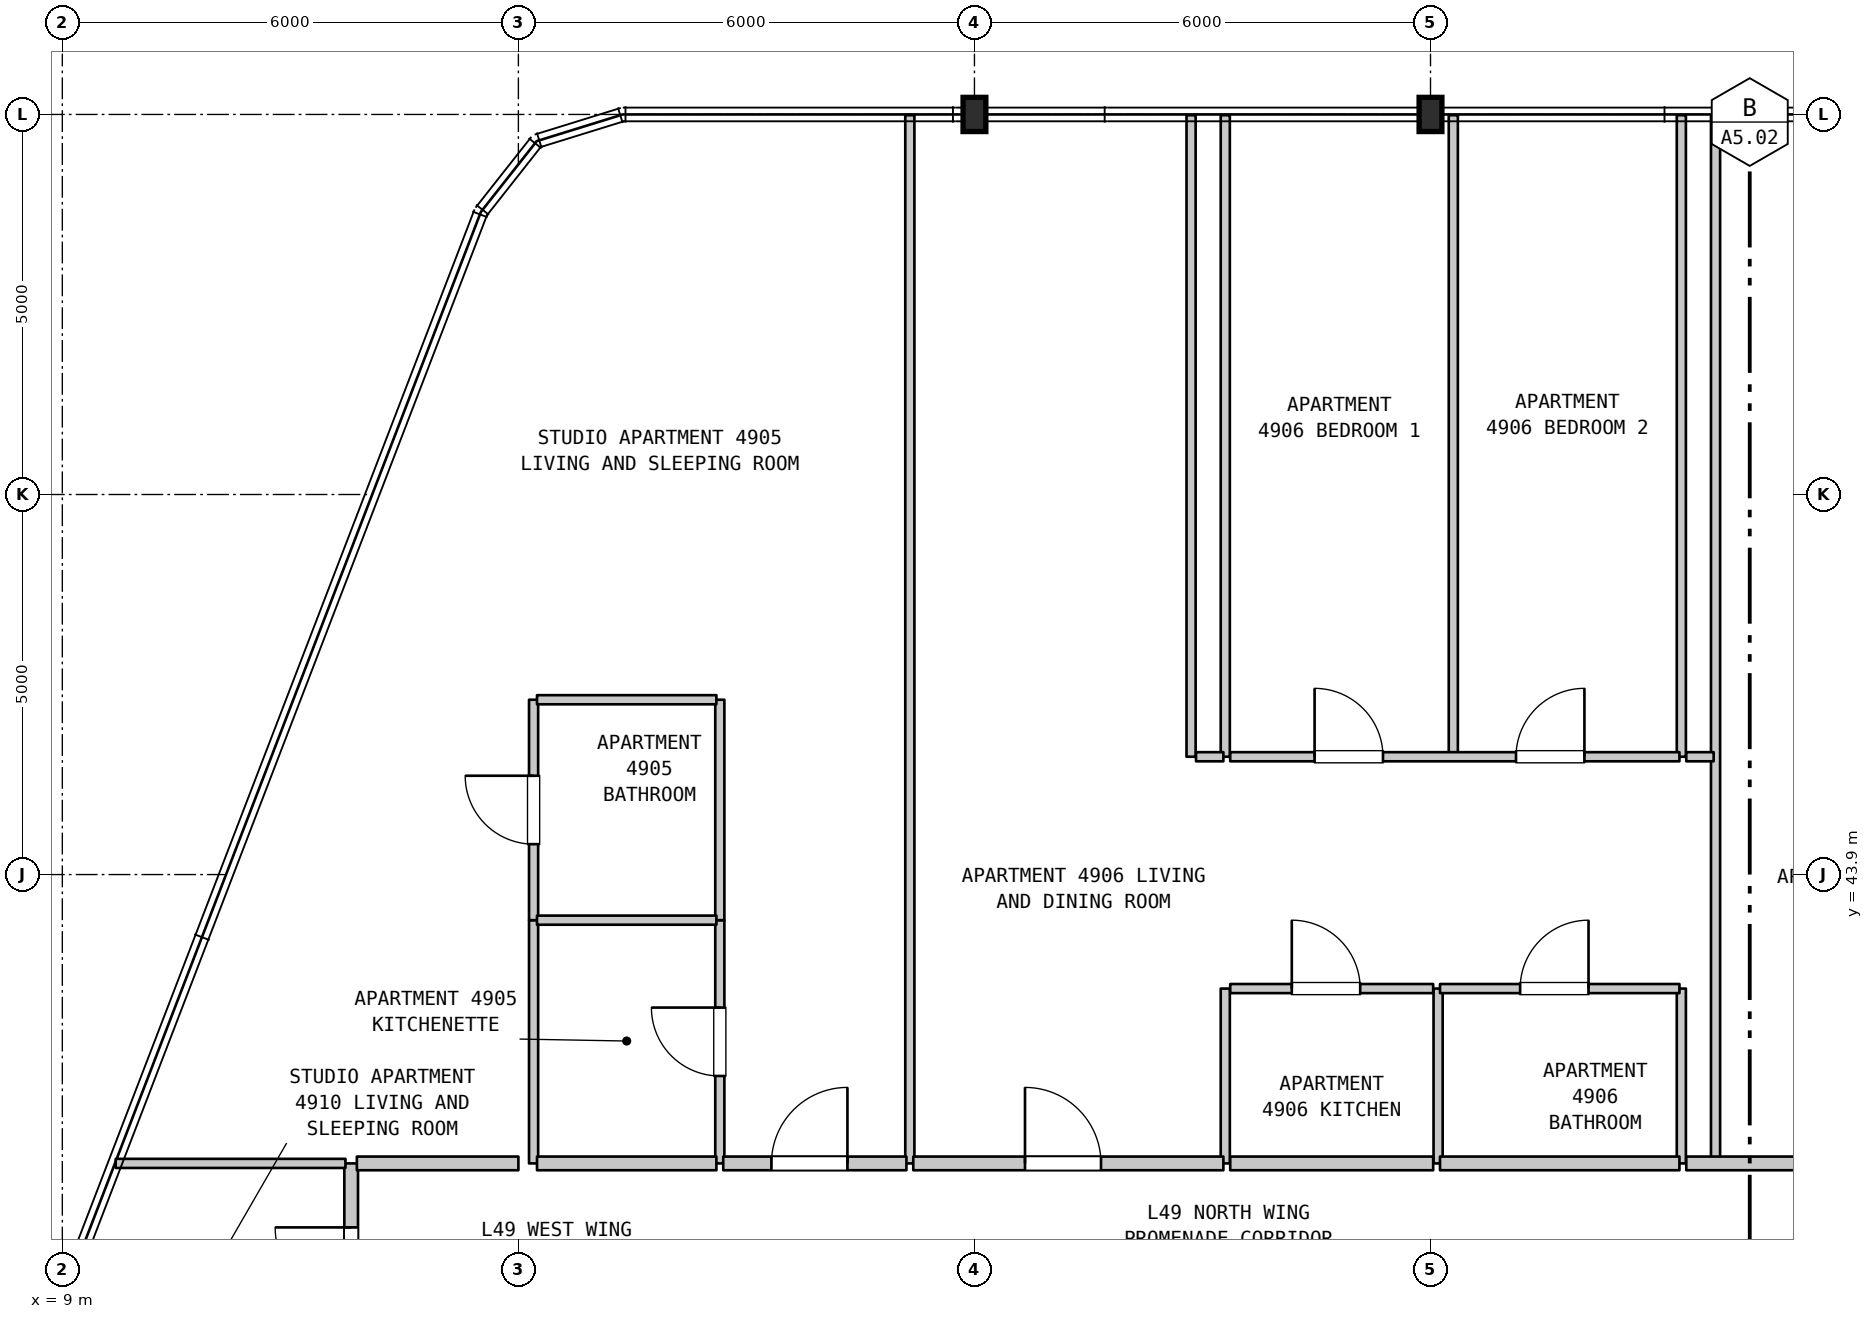
"""IFC4 building model, lengths in metres.
Left out: names, types, materials, properties, quantities, classifications, styles, units other than length and angle.
Written with IfcOpenShell. Run it as: python <this file> out.ifc"""

import sys

from ifc_helpers import new_model, si_unit, direction, frame, frame_2d, origin, origin_2d, place, context, subcontext, project, spatial, rectangle, i_section, extrude, element, fill, save


model = new_model("IFC4")
c1 = context("Model", 3, precision=1e-05, world=origin(), true_north=direction((0.0, 1.0)))
c2 = subcontext(c1, "Body", "Model", "MODEL_VIEW")
j1 = project(units=[si_unit("LENGTHUNIT", "METRE"), si_unit("PLANEANGLEUNIT", "RADIAN")], contexts=[c1])
p1 = place(None, origin())
s1 = spatial("IfcSite", under=j1, at=p1, CompositionType="ELEMENT")
p2 = place(p1, origin())
s2 = spatial("IfcBuilding", under=s1, at=p2, CompositionType="ELEMENT")
p3 = place(p2, frame((0.0, 0.0, 199.5)))
s3 = spatial("IfcBuildingStorey", under=s2, at=p3, CompositionType="ELEMENT", Elevation=199.5)
for number, where, z_axis, x_axis in (
    (1, (21.0, 53.9, 0.0), (0.0, 0.0, 1.0), (1.0, 0.0, 0.0)),
    (2, (27.0, 53.9, 0.0), (0.0, 0.0, 1.0), (1.0, 0.0, 0.0)),
):
    element("IfcColumn", number, at=place(p3, frame(where, z_axis=z_axis, x_axis=x_axis)), inside=s3, PredefinedType="COLUMN", context=c2, shape_type="SweptSolid", body=[
        extrude(i_section(OverallWidth=0.3, OverallDepth=0.45, WebThickness=0.014, FlangeThickness=0.026, FilletRadius=0.027, at=origin_2d()), origin(), (0.0, 0.0, 1.0), 3.7),
    ])
p4 = place(p3, frame((12.8, 37.416, 0.0), z_axis=(0.0, 0.0, 1.0), x_axis=(0.0, 1.0, 0.0)))
e3 = element("IfcWall", 3, at=p4, inside=s3, PredefinedType="STANDARD", context=c2, shape_type="SweptSolid", body=[
    extrude(rectangle(XDim=2.684, YDim=0.18, at=frame_2d((1.342, 0.0))), origin(), (0.0, 0.0, 1.0), 3.39),
])
p5 = place(p4, frame((0.842, 0.0, 0.0)))
e4 = element("IfcOpeningElement", 4, at=p5, cuts=e3, PredefinedType="OPENING", context=c2, shape_type="SweptSolid", body=[
    extrude(rectangle(XDim=1.0, YDim=2.15, at=frame_2d((0.5, 1.075))), frame((0.0, 0.1, 0.0), z_axis=(0.0, -1.0, 0.0), x_axis=(1.0, 0.0, 0.0)), (0.0, 0.0, 1.0), 0.2),
])
p6 = place(p3, frame((15.2, 40.1, 0.0), z_axis=(0.0, 0.0, 1.0), x_axis=(0.0, 1.0, 0.0)))
e5 = element("IfcWall", 5, at=p6, inside=s3, PredefinedType="PARTITIONING", context=c2, shape_type="SweptSolid", body=[
    extrude(rectangle(XDim=3.2, YDim=0.12, at=frame_2d((1.6, 0.0))), origin(), (0.0, 0.0, 1.0), 3.39),
])
p7 = place(p3, frame((15.2, 43.3, 0.0), z_axis=(0.0, 0.0, 1.0), x_axis=(0.0, 1.0, 0.0)))
e6 = element("IfcWall", 6, at=p7, inside=s3, PredefinedType="PARTITIONING", context=c2, shape_type="SweptSolid", body=[
    extrude(rectangle(XDim=2.9, YDim=0.12, at=frame_2d((1.45, 0.0))), origin(), (0.0, 0.0, 1.0), 3.39),
])
p8 = place(p7, frame((1.0, 0.0, 0.0)))
e7 = element("IfcOpeningElement", 7, at=p8, cuts=e6, PredefinedType="OPENING", context=c2, shape_type="SweptSolid", body=[
    extrude(rectangle(XDim=0.9, YDim=2.1, at=frame_2d((0.45, 1.05))), frame((0.0, 0.07, 0.0), z_axis=(0.0, -1.0, 0.0), x_axis=(1.0, 0.0, 0.0)), (0.0, 0.0, 1.0), 0.14),
])
p9 = place(p3, frame((17.65, 40.1, 0.0), z_axis=(0.0, 0.0, 1.0), x_axis=(0.0, 1.0, 0.0)))
e8 = element("IfcWall", 8, at=p9, inside=s3, PredefinedType="PARTITIONING", context=c2, shape_type="SweptSolid", body=[
    extrude(rectangle(XDim=3.2, YDim=0.12, at=frame_2d((1.6, 0.0))), origin(), (0.0, 0.0, 1.0), 3.39),
])
p10 = place(p9, frame((1.15, 0.0, 0.0)))
e9 = element("IfcOpeningElement", 9, at=p10, cuts=e8, PredefinedType="OPENING", context=c2, shape_type="SweptSolid", body=[
    extrude(rectangle(XDim=0.9, YDim=2.15, at=frame_2d((0.45, 1.075))), frame((0.0, 0.07, 0.0), z_axis=(0.0, -1.0, 0.0), x_axis=(1.0, 0.0, 0.0)), (0.0, 0.0, 1.0), 0.14),
])
p11 = place(p3, frame((17.65, 43.3, 0.0), z_axis=(0.0, 0.0, 1.0), x_axis=(0.0, 1.0, 0.0)))
e10 = element("IfcWall", 10, at=p11, inside=s3, PredefinedType="PARTITIONING", context=c2, shape_type="SweptSolid", body=[
    extrude(rectangle(XDim=2.9, YDim=0.12, at=frame_2d((1.45, 0.0))), origin(), (0.0, 0.0, 1.0), 3.39),
])
p12 = place(p3, frame((20.15, 40.1, 0.0), z_axis=(0.0, 0.0, 1.0), x_axis=(0.0, 1.0, 0.0)))
e11 = element("IfcWall", 11, at=p12, inside=s3, PredefinedType="PARTITIONING", context=c2, shape_type="SweptSolid", body=[
    extrude(rectangle(XDim=13.79, YDim=0.12, at=frame_2d((6.895, 0.0))), origin(), (0.0, 0.0, 1.0), 3.39),
])
p13 = place(p3, frame((23.85, 45.45, 0.0), z_axis=(0.0, 0.0, 1.0), x_axis=(0.0, 1.0, 0.0)))
e12 = element("IfcWall", 12, at=p13, inside=s3, PredefinedType="PARTITIONING", context=c2, shape_type="SweptSolid", body=[
    extrude(rectangle(XDim=8.44, YDim=0.12, at=frame_2d((4.22, 0.0))), origin(), (0.0, 0.0, 1.0), 3.39),
])
p14 = place(p3, frame((24.3, 40.1, 0.0), z_axis=(0.0, 0.0, 1.0), x_axis=(0.0, 1.0, 0.0)))
e13 = element("IfcWall", 13, at=p14, inside=s3, PredefinedType="PARTITIONING", context=c2, shape_type="SweptSolid", body=[
    extrude(rectangle(XDim=2.3, YDim=0.12, at=frame_2d((1.15, 0.0))), origin(), (0.0, 0.0, 1.0), 3.39),
])
p15 = place(p3, frame((24.3, 45.45, 0.0), z_axis=(0.0, 0.0, 1.0), x_axis=(0.0, 1.0, 0.0)))
e14 = element("IfcWall", 14, at=p15, inside=s3, PredefinedType="PARTITIONING", context=c2, shape_type="SweptSolid", body=[
    extrude(rectangle(XDim=8.44, YDim=0.12, at=frame_2d((4.22, 0.0))), origin(), (0.0, 0.0, 1.0), 3.39),
])
p16 = place(p3, frame((27.1, 40.1, 0.0), z_axis=(0.0, 0.0, 1.0), x_axis=(0.0, 1.0, 0.0)))
e15 = element("IfcWall", 15, at=p16, inside=s3, PredefinedType="PARTITIONING", context=c2, shape_type="SweptSolid", body=[
    extrude(rectangle(XDim=2.3, YDim=0.12, at=frame_2d((1.15, 0.0))), origin(), (0.0, 0.0, 1.0), 3.39),
])
p17 = place(p3, frame((27.3, 45.45, 0.0), z_axis=(0.0, 0.0, 1.0), x_axis=(0.0, 1.0, 0.0)))
e16 = element("IfcWall", 16, at=p17, inside=s3, PredefinedType="PARTITIONING", context=c2, shape_type="SweptSolid", body=[
    extrude(rectangle(XDim=8.44, YDim=0.12, at=frame_2d((4.22, 0.0))), origin(), (0.0, 0.0, 1.0), 3.39),
])
p18 = place(p3, frame((30.3, 40.1, 0.0), z_axis=(0.0, 0.0, 1.0), x_axis=(0.0, 1.0, 0.0)))
e17 = element("IfcWall", 17, at=p18, inside=s3, PredefinedType="PARTITIONING", context=c2, shape_type="SweptSolid", body=[
    extrude(rectangle(XDim=2.3, YDim=0.12, at=frame_2d((1.15, 0.0))), origin(), (0.0, 0.0, 1.0), 3.39),
])
p19 = place(p3, frame((30.3, 45.45, 0.0), z_axis=(0.0, 0.0, 1.0), x_axis=(0.0, 1.0, 0.0)))
e18 = element("IfcWall", 18, at=p19, inside=s3, PredefinedType="PARTITIONING", context=c2, shape_type="SweptSolid", body=[
    extrude(rectangle(XDim=8.44, YDim=0.12, at=frame_2d((4.22, 0.0))), origin(), (0.0, 0.0, 1.0), 3.39),
])
p20 = place(p3, frame((30.75, 40.1, 0.0), z_axis=(0.0, 0.0, 1.0), x_axis=(0.0, 1.0, 0.0)))
e19 = element("IfcWall", 19, at=p20, inside=s3, PredefinedType="PARTITIONING", context=c2, shape_type="SweptSolid", body=[
    extrude(rectangle(XDim=13.79, YDim=0.12, at=frame_2d((6.895, 0.0))), origin(), (0.0, 0.0, 1.0), 3.39),
])
p21 = place(p3, frame((9.702, 40.1, 0.0), z_axis=(0.0, 0.0, 1.0), x_axis=(1.0, 0.0, 0.0)))
e20 = element("IfcWall", 20, at=p21, inside=s3, PredefinedType="PARTITIONING", context=c2, shape_type="SweptSolid", body=[
    extrude(rectangle(XDim=3.023, YDim=0.12, at=frame_2d((1.512, 0.0))), origin(), (0.0, 0.0, 1.0), 3.39),
])
p22 = place(p3, frame((12.875, 40.1, 0.0), z_axis=(0.0, 0.0, 1.0), x_axis=(1.0, 0.0, 0.0)))
e21 = element("IfcWall", 21, at=p22, inside=s3, PredefinedType="STANDARD", context=c2, shape_type="SweptSolid", body=[
    extrude(rectangle(XDim=2.125, YDim=0.18, at=frame_2d((1.062, 0.0))), origin(), (0.0, 0.0, 1.0), 3.39),
])
p23 = place(p3, frame((15.245, 40.1, 0.0), z_axis=(0.0, 0.0, 1.0), x_axis=(1.0, 0.0, 0.0)))
e22 = element("IfcWall", 22, at=p23, inside=s3, PredefinedType="STANDARD", context=c2, shape_type="SweptSolid", body=[
    extrude(rectangle(XDim=2.36, YDim=0.18, at=frame_2d((1.18, 0.0))), origin(), (0.0, 0.0, 1.0), 3.39),
])
p24 = place(p3, frame((17.695, 40.1, 0.0), z_axis=(0.0, 0.0, 1.0), x_axis=(1.0, 0.0, 0.0)))
e23 = element("IfcWall", 23, at=p24, inside=s3, PredefinedType="STANDARD", context=c2, shape_type="SweptSolid", body=[
    extrude(rectangle(XDim=2.41, YDim=0.18, at=frame_2d((1.205, 0.0))), origin(), (0.0, 0.0, 1.0), 3.39),
])
p25 = place(p24, frame((0.634, 0.0, 0.0)))
e24 = element("IfcOpeningElement", 24, at=p25, cuts=e23, PredefinedType="OPENING", context=c2, shape_type="SweptSolid", body=[
    extrude(rectangle(XDim=1.0, YDim=2.15, at=frame_2d((0.5, 1.075))), frame((0.0, 0.1, 0.0), z_axis=(0.0, -1.0, 0.0), x_axis=(1.0, 0.0, 0.0)), (0.0, 0.0, 1.0), 0.2),
])
p26 = place(p3, frame((20.195, 40.1, 0.0), z_axis=(0.0, 0.0, 1.0), x_axis=(1.0, 0.0, 0.0)))
e25 = element("IfcWall", 25, at=p26, inside=s3, PredefinedType="STANDARD", context=c2, shape_type="SweptSolid", body=[
    extrude(rectangle(XDim=4.08, YDim=0.18, at=frame_2d((2.04, 0.0))), origin(), (0.0, 0.0, 1.0), 3.39),
])
p27 = place(p26, frame((1.47, 0.0, 0.0)))
e26 = element("IfcOpeningElement", 26, at=p27, cuts=e25, PredefinedType="OPENING", context=c2, shape_type="SweptSolid", body=[
    extrude(rectangle(XDim=1.0, YDim=2.15, at=frame_2d((0.5, 1.075))), frame((0.0, 0.1, 0.0), z_axis=(0.0, -1.0, 0.0), x_axis=(1.0, 0.0, 0.0)), (0.0, 0.0, 1.0), 0.2),
])
p28 = place(p3, frame((24.365, 40.1, 0.0), z_axis=(0.0, 0.0, 1.0), x_axis=(1.0, 0.0, 0.0)))
e27 = element("IfcWall", 27, at=p28, inside=s3, PredefinedType="STANDARD", context=c2, shape_type="SweptSolid", body=[
    extrude(rectangle(XDim=2.67, YDim=0.18, at=frame_2d((1.335, 0.0))), origin(), (0.0, 0.0, 1.0), 3.39),
])
p29 = place(p3, frame((27.125, 40.1, 0.0), z_axis=(0.0, 0.0, 1.0), x_axis=(1.0, 0.0, 0.0)))
e28 = element("IfcWall", 28, at=p29, inside=s3, PredefinedType="STANDARD", context=c2, shape_type="SweptSolid", body=[
    extrude(rectangle(XDim=3.15, YDim=0.18, at=frame_2d((1.575, 0.0))), origin(), (0.0, 0.0, 1.0), 3.39),
])
p30 = place(p3, frame((30.365, 40.1, 0.0), z_axis=(0.0, 0.0, 1.0), x_axis=(1.0, 0.0, 0.0)))
e29 = element("IfcWall", 29, at=p30, inside=s3, PredefinedType="STANDARD", context=c2, shape_type="SweptSolid", body=[
    extrude(rectangle(XDim=4.75, YDim=0.18, at=frame_2d((2.375, 0.0))), origin(), (0.0, 0.0, 1.0), 3.39),
])
p31 = place(p30, frame((2.075, 0.0, 0.0)))
e30 = element("IfcOpeningElement", 30, at=p31, cuts=e29, PredefinedType="OPENING", context=c2, shape_type="SweptSolid", body=[
    extrude(rectangle(XDim=1.0, YDim=2.15, at=frame_2d((0.5, 1.075))), frame((0.0, 0.1, 0.0), z_axis=(0.0, -1.0, 0.0), x_axis=(1.0, 0.0, 0.0)), (0.0, 0.0, 1.0), 0.2),
])
p32 = place(p3, frame((24.365, 42.4, 0.0), z_axis=(0.0, 0.0, 1.0), x_axis=(1.0, 0.0, 0.0)))
e31 = element("IfcWall", 31, at=p32, inside=s3, PredefinedType="PARTITIONING", context=c2, shape_type="SweptSolid", body=[
    extrude(rectangle(XDim=2.67, YDim=0.12, at=frame_2d((1.335, 0.0))), origin(), (0.0, 0.0, 1.0), 3.39),
])
p33 = place(p32, frame((0.81, 0.0, 0.0)))
e32 = element("IfcOpeningElement", 32, at=p33, cuts=e31, PredefinedType="OPENING", context=c2, shape_type="SweptSolid", body=[
    extrude(rectangle(XDim=0.9, YDim=2.15, at=frame_2d((0.45, 1.075))), frame((0.0, 0.07, 0.0), z_axis=(0.0, -1.0, 0.0), x_axis=(1.0, 0.0, 0.0)), (0.0, 0.0, 1.0), 0.14),
])
p34 = place(p3, frame((27.125, 42.4, 0.0), z_axis=(0.0, 0.0, 1.0), x_axis=(1.0, 0.0, 0.0)))
e33 = element("IfcWall", 33, at=p34, inside=s3, PredefinedType="PARTITIONING", context=c2, shape_type="SweptSolid", body=[
    extrude(rectangle(XDim=3.15, YDim=0.12, at=frame_2d((1.575, 0.0))), origin(), (0.0, 0.0, 1.0), 3.39),
])
p35 = place(p34, frame((1.054, 0.0, 0.0)))
e34 = element("IfcOpeningElement", 34, at=p35, cuts=e33, PredefinedType="OPENING", context=c2, shape_type="SweptSolid", body=[
    extrude(rectangle(XDim=0.9, YDim=2.1, at=frame_2d((0.45, 1.05))), frame((0.0, 0.07, 0.0), z_axis=(0.0, -1.0, 0.0), x_axis=(1.0, 0.0, 0.0)), (0.0, 0.0, 1.0), 0.14),
])
p36 = place(p3, frame((15.245, 43.3, 0.0), z_axis=(0.0, 0.0, 1.0), x_axis=(1.0, 0.0, 0.0)))
e35 = element("IfcWall", 35, at=p36, inside=s3, PredefinedType="PARTITIONING", context=c2, shape_type="SweptSolid", body=[
    extrude(rectangle(XDim=2.36, YDim=0.12, at=frame_2d((1.18, 0.0))), origin(), (0.0, 0.0, 1.0), 3.39),
])
p37 = place(p3, frame((23.915, 45.45, 0.0), z_axis=(0.0, 0.0, 1.0), x_axis=(1.0, 0.0, 0.0)))
e36 = element("IfcWall", 36, at=p37, inside=s3, PredefinedType="PARTITIONING", context=c2, shape_type="SweptSolid", body=[
    extrude(rectangle(XDim=0.36, YDim=0.12, at=frame_2d((0.18, 0.0))), origin(), (0.0, 0.0, 1.0), 3.39),
])
p38 = place(p3, frame((24.365, 45.45, 0.0), z_axis=(0.0, 0.0, 1.0), x_axis=(1.0, 0.0, 0.0)))
e37 = element("IfcWall", 37, at=p38, inside=s3, PredefinedType="PARTITIONING", context=c2, shape_type="SweptSolid", body=[
    extrude(rectangle(XDim=5.91, YDim=0.12, at=frame_2d((2.955, 0.0))), origin(), (0.0, 0.0, 1.0), 3.39),
])
p39 = place(p38, frame((1.11, 0.0, 0.0)))
e38 = element("IfcOpeningElement", 38, at=p39, cuts=e37, PredefinedType="OPENING", context=c2, shape_type="SweptSolid", body=[
    extrude(rectangle(XDim=0.9, YDim=2.15, at=frame_2d((0.45, 1.075))), frame((0.0, 0.07, 0.0), z_axis=(0.0, -1.0, 0.0), x_axis=(1.0, 0.0, 0.0)), (0.0, 0.0, 1.0), 0.14),
])
p40 = place(p38, frame((3.76, 0.0, 0.0)))
e39 = element("IfcOpeningElement", 39, at=p40, cuts=e37, PredefinedType="OPENING", context=c2, shape_type="SweptSolid", body=[
    extrude(rectangle(XDim=0.9, YDim=2.15, at=frame_2d((0.45, 1.075))), frame((0.0, 0.07, 0.0), z_axis=(0.0, -1.0, 0.0), x_axis=(1.0, 0.0, 0.0)), (0.0, 0.0, 1.0), 0.14),
])
p41 = place(p3, frame((30.365, 45.45, 0.0), z_axis=(0.0, 0.0, 1.0), x_axis=(1.0, 0.0, 0.0)))
e40 = element("IfcWall", 40, at=p41, inside=s3, PredefinedType="PARTITIONING", context=c2, shape_type="SweptSolid", body=[
    extrude(rectangle(XDim=0.36, YDim=0.12, at=frame_2d((0.18, 0.0))), origin(), (0.0, 0.0, 1.0), 3.39),
])
p42 = place(p3, frame((15.245, 46.2, 0.0), z_axis=(0.0, 0.0, 1.0), x_axis=(1.0, 0.0, 0.0)))
e41 = element("IfcWall", 41, at=p42, inside=s3, PredefinedType="PARTITIONING", context=c2, shape_type="SweptSolid", body=[
    extrude(rectangle(XDim=2.36, YDim=0.12, at=frame_2d((1.18, 0.0))), origin(), (0.0, 0.0, 1.0), 3.39),
])
p43 = place(p5, origin())
e42 = element("IfcDoor", 42, at=p43, inside=s3, OperationType="SINGLE_SWING_RIGHT", PredefinedType="DOOR", context=c2, shape_type="SweptSolid", body=[
    extrude(rectangle(XDim=1.0, YDim=2.15, at=frame_2d((0.5, 1.075))), frame((0.0, 0.025, 0.0), z_axis=(0.0, -1.0, 0.0), x_axis=(1.0, 0.0, 0.0)), (0.0, 0.0, 1.0), 0.05),
])
fill(e4, e42)
p44 = place(p8, origin())
e43 = element("IfcDoor", 43, at=p44, inside=s3, OperationType="SINGLE_SWING_RIGHT", PredefinedType="DOOR", context=c2, shape_type="SweptSolid", body=[
    extrude(rectangle(XDim=0.9, YDim=2.1, at=frame_2d((0.45, 1.05))), frame((0.0, 0.025, 0.0), z_axis=(0.0, -1.0, 0.0), x_axis=(1.0, 0.0, 0.0)), (0.0, 0.0, 1.0), 0.05),
])
fill(e7, e43)
p45 = place(p10, origin())
e44 = element("IfcDoor", 44, at=p45, inside=s3, OperationType="SINGLE_SWING_RIGHT", PredefinedType="DOOR", context=c2, shape_type="SweptSolid", body=[
    extrude(rectangle(XDim=0.9, YDim=2.15, at=frame_2d((0.45, 1.075))), frame((0.0, 0.025, 0.0), z_axis=(0.0, -1.0, 0.0), x_axis=(1.0, 0.0, 0.0)), (0.0, 0.0, 1.0), 0.05),
])
fill(e9, e44)
p46 = place(p25, origin())
e45 = element("IfcDoor", 45, at=p46, inside=s3, OperationType="SINGLE_SWING_RIGHT", PredefinedType="DOOR", context=c2, shape_type="SweptSolid", body=[
    extrude(rectangle(XDim=1.0, YDim=2.15, at=frame_2d((0.5, 1.075))), frame((0.0, 0.025, 0.0), z_axis=(0.0, -1.0, 0.0), x_axis=(1.0, 0.0, 0.0)), (0.0, 0.0, 1.0), 0.05),
])
fill(e24, e45)
p47 = place(p27, origin())
e46 = element("IfcDoor", 46, at=p47, inside=s3, OperationType="SINGLE_SWING_LEFT", PredefinedType="DOOR", context=c2, shape_type="SweptSolid", body=[
    extrude(rectangle(XDim=1.0, YDim=2.15, at=frame_2d((0.5, 1.075))), frame((0.0, 0.025, 0.0), z_axis=(0.0, -1.0, 0.0), x_axis=(1.0, 0.0, 0.0)), (0.0, 0.0, 1.0), 0.05),
])
fill(e26, e46)
p48 = place(p33, origin())
e47 = element("IfcDoor", 47, at=p48, inside=s3, OperationType="SINGLE_SWING_LEFT", PredefinedType="DOOR", context=c2, shape_type="SweptSolid", body=[
    extrude(rectangle(XDim=0.9, YDim=2.15, at=frame_2d((0.45, 1.075))), frame((0.0, 0.025, 0.0), z_axis=(0.0, -1.0, 0.0), x_axis=(1.0, 0.0, 0.0)), (0.0, 0.0, 1.0), 0.05),
])
fill(e32, e47)
p49 = place(p35, origin())
e48 = element("IfcDoor", 48, at=p49, inside=s3, OperationType="SINGLE_SWING_RIGHT", PredefinedType="DOOR", context=c2, shape_type="SweptSolid", body=[
    extrude(rectangle(XDim=0.9, YDim=2.1, at=frame_2d((0.45, 1.05))), frame((0.0, 0.025, 0.0), z_axis=(0.0, -1.0, 0.0), x_axis=(1.0, 0.0, 0.0)), (0.0, 0.0, 1.0), 0.05),
])
fill(e34, e48)
p50 = place(p39, origin())
e49 = element("IfcDoor", 49, at=p50, inside=s3, OperationType="SINGLE_SWING_LEFT", PredefinedType="DOOR", context=c2, shape_type="SweptSolid", body=[
    extrude(rectangle(XDim=0.9, YDim=2.15, at=frame_2d((0.45, 1.075))), frame((0.0, 0.025, 0.0), z_axis=(0.0, -1.0, 0.0), x_axis=(1.0, 0.0, 0.0)), (0.0, 0.0, 1.0), 0.05),
])
fill(e38, e49)
p51 = place(p40, origin())
e50 = element("IfcDoor", 50, at=p51, inside=s3, OperationType="SINGLE_SWING_RIGHT", PredefinedType="DOOR", context=c2, shape_type="SweptSolid", body=[
    extrude(rectangle(XDim=0.9, YDim=2.15, at=frame_2d((0.45, 1.075))), frame((0.0, 0.025, 0.0), z_axis=(0.0, -1.0, 0.0), x_axis=(1.0, 0.0, 0.0)), (0.0, 0.0, 1.0), 0.05),
])
fill(e39, e50)
save(model, sys.argv[1])
